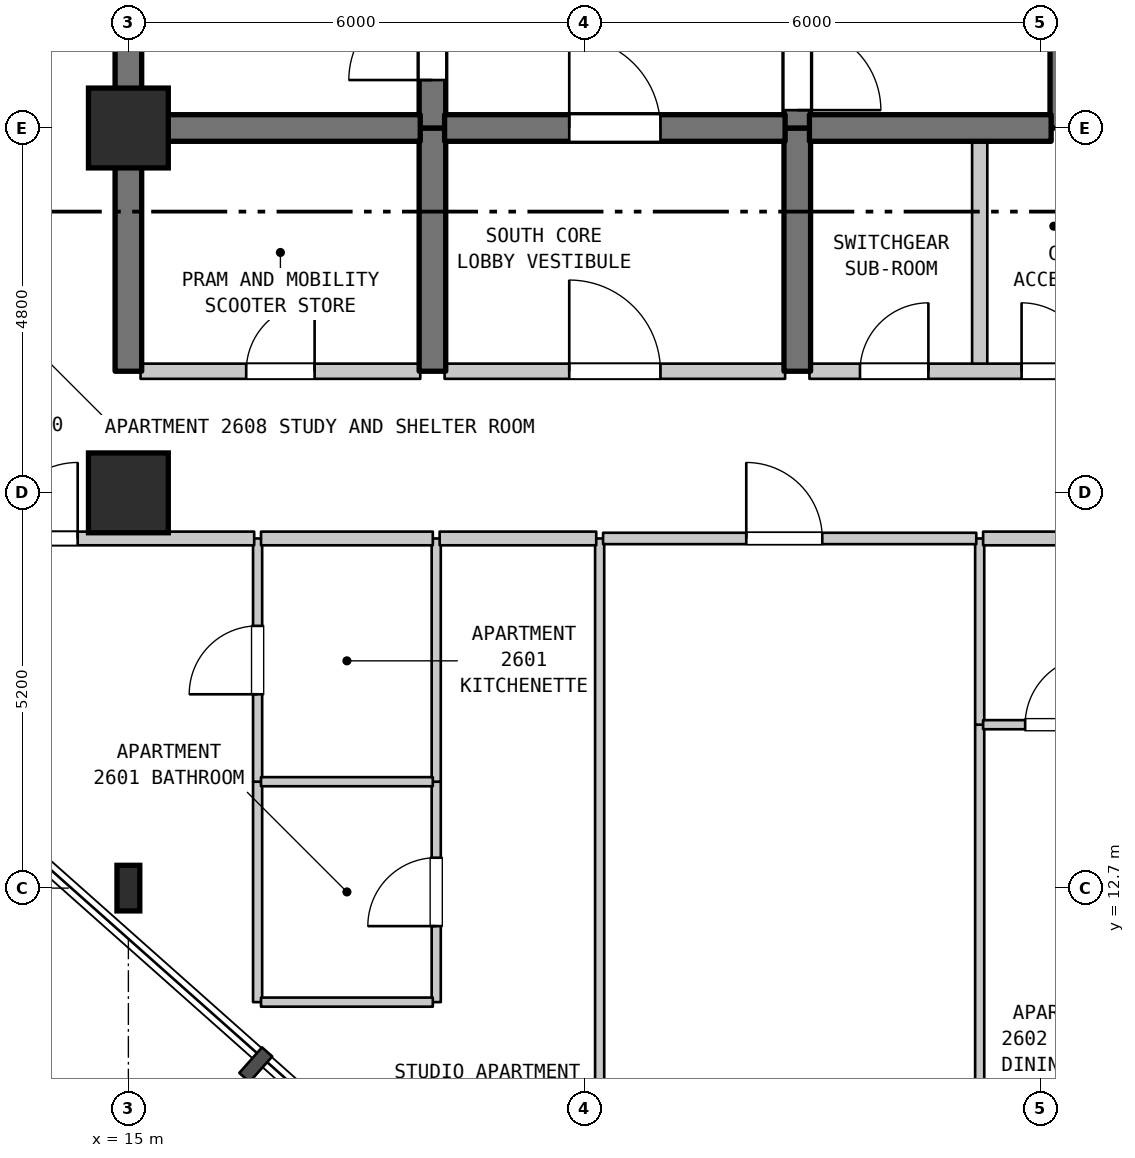
"""IFC4 building model, lengths in metres.
Left out: names, types, materials, properties, quantities, classifications, styles, units other than length and angle.
Written with IfcOpenShell. Run it as: python <this file> out.ifc"""

import sys

from ifc_helpers import new_model, si_unit, direction, frame, frame_2d, origin, origin_2d, place, context, subcontext, project, spatial, rectangle, i_section, extrude, element, fill, save


model = new_model("IFC4")
c1 = context("Model", 3, precision=1e-05, world=origin(), true_north=direction((0.0, 1.0)))
c2 = subcontext(c1, "Body", "Model", "MODEL_VIEW")
j1 = project(units=[si_unit("LENGTHUNIT", "METRE"), si_unit("PLANEANGLEUNIT", "RADIAN")], contexts=[c1])
p1 = place(None, origin())
s1 = spatial("IfcSite", under=j1, at=p1, CompositionType="ELEMENT")
p2 = place(p1, origin())
s2 = spatial("IfcBuilding", under=s1, at=p2, CompositionType="ELEMENT")
p3 = place(p2, frame((0.0, 0.0, 109.4)))
s3 = spatial("IfcBuildingStorey", under=s2, at=p3, CompositionType="ELEMENT", Elevation=109.4)
p4 = place(p3, frame((15.0, 12.7, 0.0), z_axis=(0.0, 0.0, 1.0), x_axis=(1.0, 0.0, 0.0)))
e1 = element("IfcColumn", 1, at=p4, inside=s3, PredefinedType="COLUMN", context=c2, shape_type="SweptSolid", body=[
    extrude(i_section(OverallWidth=0.3, OverallDepth=0.6, WebThickness=0.015, FlangeThickness=0.03, FilletRadius=0.027, at=origin_2d()), origin(), (0.0, 0.0, 1.0), 3.7),
])
for number, where, z_axis, x_axis in (
    (2, (15.0, 17.9, 0.0), (0.0, 0.0, 1.0), (1.0, 0.0, 0.0)),
    (3, (15.0, 22.7, 0.0), (0.0, 0.0, 1.0), (1.0, 0.0, 0.0)),
):
    element("IfcColumn", number, at=place(p3, frame(where, z_axis=z_axis, x_axis=x_axis)), inside=s3, PredefinedType="COLUMN", context=c2, shape_type="SweptSolid", body=[
        extrude(rectangle(XDim=1.05, YDim=1.05, at=origin_2d()), origin(), (0.0, 0.0, 1.0), 3.7),
    ])
p5 = place(p3, frame((15.0, 19.5, 0.0), z_axis=(0.0, 0.0, 1.0), x_axis=(0.0, 1.0, 0.0)))
e4 = element("IfcWall", 4, at=p5, inside=s3, PredefinedType="SHEAR", context=c2, shape_type="SweptSolid", body=[
    extrude(rectangle(XDim=3.2, YDim=0.35, at=frame_2d((1.6, 0.0))), origin(), (0.0, 0.0, 1.0), 3.385),
])
p6 = place(p3, frame((15.0, 22.7, 0.0), z_axis=(0.0, 0.0, 1.0), x_axis=(0.0, 1.0, 0.0)))
e5 = element("IfcWall", 5, at=p6, inside=s3, PredefinedType="SHEAR", context=c2, shape_type="SweptSolid", body=[
    extrude(rectangle(XDim=6.8, YDim=0.35, at=frame_2d((3.4, 0.0))), origin(), (0.0, 0.0, 1.0), 3.385),
])
p7 = place(p3, frame((16.7, 11.2, 0.0), z_axis=(0.0, 0.0, 1.0), x_axis=(0.0, 1.0, 0.0)))
e6 = element("IfcWall", 6, at=p7, inside=s3, PredefinedType="PARTITIONING", context=c2, shape_type="SweptSolid", body=[
    extrude(rectangle(XDim=2.9, YDim=0.12, at=frame_2d((1.45, 0.0))), origin(), (0.0, 0.0, 1.0), 3.385),
])
p8 = place(p3, frame((16.7, 14.1, 0.0), z_axis=(0.0, 0.0, 1.0), x_axis=(0.0, 1.0, 0.0)))
e7 = element("IfcWall", 7, at=p8, inside=s3, PredefinedType="PARTITIONING", context=c2, shape_type="SweptSolid", body=[
    extrude(rectangle(XDim=3.2, YDim=0.12, at=frame_2d((1.6, 0.0))), origin(), (0.0, 0.0, 1.0), 3.385),
])
p9 = place(p8, frame((1.15, 0.0, 0.0)))
e8 = element("IfcOpeningElement", 8, at=p9, cuts=e7, PredefinedType="OPENING", context=c2, shape_type="SweptSolid", body=[
    extrude(rectangle(XDim=0.9, YDim=2.15, at=frame_2d((0.45, 1.075))), frame((0.0, 0.07, 0.0), z_axis=(0.0, -1.0, 0.0), x_axis=(1.0, 0.0, 0.0)), (0.0, 0.0, 1.0), 0.14),
])
p10 = place(p3, frame((19.0, 19.5, 0.0), z_axis=(0.0, 0.0, 1.0), x_axis=(0.0, 1.0, 0.0)))
e9 = element("IfcWall", 9, at=p10, inside=s3, PredefinedType="SHEAR", context=c2, shape_type="SweptSolid", body=[
    extrude(rectangle(XDim=3.2, YDim=0.35, at=frame_2d((1.6, 0.0))), origin(), (0.0, 0.0, 1.0), 3.385),
])
p11 = place(p3, frame((19.0, 22.7, 0.0), z_axis=(0.0, 0.0, 1.0), x_axis=(0.0, 1.0, 0.0)))
e10 = element("IfcWall", 10, at=p11, inside=s3, PredefinedType="SHEAR", context=c2, shape_type="SweptSolid", body=[
    extrude(rectangle(XDim=5.5, YDim=0.35, at=frame_2d((2.75, 0.0))), origin(), (0.0, 0.0, 1.0), 3.385),
])
p12 = place(p11, frame((0.631, 0.0, 0.0)))
e11 = element("IfcOpeningElement", 11, at=p12, cuts=e10, PredefinedType="OPENING", context=c2, shape_type="SweptSolid", body=[
    extrude(rectangle(XDim=1.1, YDim=2.15, at=frame_2d((0.55, 1.075))), frame((0.0, 0.185, 0.0), z_axis=(0.0, -1.0, 0.0), x_axis=(1.0, 0.0, 0.0)), (0.0, 0.0, 1.0), 0.37),
])
p13 = place(p3, frame((19.05, 11.2, 0.0), z_axis=(0.0, 0.0, 1.0), x_axis=(0.0, 1.0, 0.0)))
e12 = element("IfcWall", 12, at=p13, inside=s3, PredefinedType="PARTITIONING", context=c2, shape_type="SweptSolid", body=[
    extrude(rectangle(XDim=2.9, YDim=0.12, at=frame_2d((1.45, 0.0))), origin(), (0.0, 0.0, 1.0), 3.385),
])
p14 = place(p13, frame((1.0, 0.0, 0.0)))
e13 = element("IfcOpeningElement", 13, at=p14, cuts=e12, PredefinedType="OPENING", context=c2, shape_type="SweptSolid", body=[
    extrude(rectangle(XDim=0.9, YDim=2.1, at=frame_2d((0.45, 1.05))), frame((0.0, 0.07, 0.0), z_axis=(0.0, -1.0, 0.0), x_axis=(1.0, 0.0, 0.0)), (0.0, 0.0, 1.0), 0.14),
])
p15 = place(p3, frame((19.05, 14.1, 0.0), z_axis=(0.0, 0.0, 1.0), x_axis=(0.0, 1.0, 0.0)))
e14 = element("IfcWall", 14, at=p15, inside=s3, PredefinedType="PARTITIONING", context=c2, shape_type="SweptSolid", body=[
    extrude(rectangle(XDim=3.2, YDim=0.12, at=frame_2d((1.6, 0.0))), origin(), (0.0, 0.0, 1.0), 3.385),
])
p16 = place(p3, frame((21.2, 2.227, 0.0), z_axis=(0.0, 0.0, 1.0), x_axis=(0.0, 1.0, 0.0)))
e15 = element("IfcWall", 15, at=p16, inside=s3, PredefinedType="PARTITIONING", context=c2, shape_type="SweptSolid", body=[
    extrude(rectangle(XDim=15.073, YDim=0.12, at=frame_2d((7.537, 0.0))), origin(), (0.0, 0.0, 1.0), 3.385),
])
p17 = place(p3, frame((23.8, 19.5, 0.0), z_axis=(0.0, 0.0, 1.0), x_axis=(0.0, 1.0, 0.0)))
e16 = element("IfcWall", 16, at=p17, inside=s3, PredefinedType="SHEAR", context=c2, shape_type="SweptSolid", body=[
    extrude(rectangle(XDim=3.2, YDim=0.35, at=frame_2d((1.6, 0.0))), origin(), (0.0, 0.0, 1.0), 3.385),
])
p18 = place(p3, frame((23.8, 22.7, 0.0), z_axis=(0.0, 0.0, 1.0), x_axis=(0.0, 1.0, 0.0)))
e17 = element("IfcWall", 17, at=p18, inside=s3, PredefinedType="SHEAR", context=c2, shape_type="SweptSolid", body=[
    extrude(rectangle(XDim=5.5, YDim=0.35, at=frame_2d((2.75, 0.0))), origin(), (0.0, 0.0, 1.0), 3.385),
])
p19 = place(p18, frame((0.235, 0.0, 0.0)))
e18 = element("IfcOpeningElement", 18, at=p19, cuts=e17, PredefinedType="OPENING", context=c2, shape_type="SweptSolid", body=[
    extrude(rectangle(XDim=1.1, YDim=2.15, at=frame_2d((0.55, 1.075))), frame((0.0, 0.185, 0.0), z_axis=(0.0, -1.0, 0.0), x_axis=(1.0, 0.0, 0.0)), (0.0, 0.0, 1.0), 0.37),
])
p20 = place(p3, frame((26.2, 0.71, 0.0), z_axis=(0.0, 0.0, 1.0), x_axis=(0.0, 1.0, 0.0)))
e19 = element("IfcWall", 19, at=p20, inside=s3, PredefinedType="PARTITIONING", context=c2, shape_type="SweptSolid", body=[
    extrude(rectangle(XDim=14.14, YDim=0.12, at=frame_2d((7.07, 0.0))), origin(), (0.0, 0.0, 1.0), 3.385),
])
p21 = place(p3, frame((26.2, 14.85, 0.0), z_axis=(0.0, 0.0, 1.0), x_axis=(0.0, 1.0, 0.0)))
e20 = element("IfcWall", 20, at=p21, inside=s3, PredefinedType="PARTITIONING", context=c2, shape_type="SweptSolid", body=[
    extrude(rectangle(XDim=2.45, YDim=0.12, at=frame_2d((1.225, 0.0))), origin(), (0.0, 0.0, 1.0), 3.385),
])
p22 = place(p3, frame((26.2, 19.5, 0.0), z_axis=(0.0, 0.0, 1.0), x_axis=(0.0, 1.0, 0.0)))
e21 = element("IfcWall", 21, at=p22, inside=s3, PredefinedType="STANDARD", context=c2, shape_type="SweptSolid", body=[
    extrude(rectangle(XDim=3.2, YDim=0.2, at=frame_2d((1.6, 0.0))), origin(), (0.0, 0.0, 1.0), 3.385),
])
p23 = place(p3, frame((27.3, 22.7, 0.0), z_axis=(0.0, 0.0, 1.0), x_axis=(0.0, 1.0, 0.0)))
e22 = element("IfcWall", 22, at=p23, inside=s3, PredefinedType="SHEAR", context=c2, shape_type="SweptSolid", body=[
    extrude(rectangle(XDim=2.9, YDim=0.35, at=frame_2d((1.45, 0.0))), origin(), (0.0, 0.0, 1.0), 3.385),
])
for number, where, z_axis, x_axis in (
    (23, (16.745, 11.2, 0.0), (0.0, 0.0, 1.0), (1.0, 0.0, 0.0)),
    (24, (16.745, 14.1, 0.0), (0.0, 0.0, 1.0), (1.0, 0.0, 0.0)),
):
    element("IfcWall", number, at=place(p3, frame(where, z_axis=z_axis, x_axis=x_axis)), inside=s3, PredefinedType="PARTITIONING", context=c2, shape_type="SweptSolid", body=[
        extrude(rectangle(XDim=2.26, YDim=0.12, at=frame_2d((1.13, 0.0))), origin(), (0.0, 0.0, 1.0), 3.385),
    ])
p24 = place(p3, frame((26.245, 14.85, 0.0), z_axis=(0.0, 0.0, 1.0), x_axis=(1.0, 0.0, 0.0)))
e25 = element("IfcWall", 25, at=p24, inside=s3, PredefinedType="PARTITIONING", context=c2, shape_type="SweptSolid", body=[
    extrude(rectangle(XDim=2.16, YDim=0.12, at=frame_2d((1.08, 0.0))), origin(), (0.0, 0.0, 1.0), 3.385),
])
p25 = place(p24, frame((0.553, 0.0, 0.0)))
e26 = element("IfcOpeningElement", 26, at=p25, cuts=e25, PredefinedType="OPENING", context=c2, shape_type="SweptSolid", body=[
    extrude(rectangle(XDim=0.9, YDim=2.15, at=frame_2d((0.45, 1.075))), frame((0.0, 0.07, 0.0), z_axis=(0.0, -1.0, 0.0), x_axis=(1.0, 0.0, 0.0)), (0.0, 0.0, 1.0), 0.14),
])
p26 = place(p3, frame((12.875, 17.3, 0.0), z_axis=(0.0, 0.0, 1.0), x_axis=(1.0, 0.0, 0.0)))
e27 = element("IfcWall", 27, at=p26, inside=s3, PredefinedType="STANDARD", context=c2, shape_type="SweptSolid", body=[
    extrude(rectangle(XDim=3.78, YDim=0.18, at=frame_2d((1.89, 0.0))), origin(), (0.0, 0.0, 1.0), 3.385),
])
p27 = place(p26, frame((0.458, 0.0, 0.0)))
e28 = element("IfcOpeningElement", 28, at=p27, cuts=e27, PredefinedType="OPENING", context=c2, shape_type="SweptSolid", body=[
    extrude(rectangle(XDim=1.0, YDim=2.15, at=frame_2d((0.5, 1.075))), frame((0.0, 0.1, 0.0), z_axis=(0.0, -1.0, 0.0), x_axis=(1.0, 0.0, 0.0)), (0.0, 0.0, 1.0), 0.2),
])
p28 = place(p3, frame((16.745, 17.3, 0.0), z_axis=(0.0, 0.0, 1.0), x_axis=(1.0, 0.0, 0.0)))
e29 = element("IfcWall", 29, at=p28, inside=s3, PredefinedType="STANDARD", context=c2, shape_type="SweptSolid", body=[
    extrude(rectangle(XDim=2.26, YDim=0.18, at=frame_2d((1.13, 0.0))), origin(), (0.0, 0.0, 1.0), 3.385),
])
p29 = place(p3, frame((19.095, 17.3, 0.0), z_axis=(0.0, 0.0, 1.0), x_axis=(1.0, 0.0, 0.0)))
e30 = element("IfcWall", 30, at=p29, inside=s3, PredefinedType="STANDARD", context=c2, shape_type="SweptSolid", body=[
    extrude(rectangle(XDim=2.06, YDim=0.18, at=frame_2d((1.03, 0.0))), origin(), (0.0, 0.0, 1.0), 3.385),
])
p30 = place(p3, frame((21.245, 17.3, 0.0), z_axis=(0.0, 0.0, 1.0), x_axis=(1.0, 0.0, 0.0)))
e31 = element("IfcWall", 31, at=p30, inside=s3, PredefinedType="STANDARD", context=c2, shape_type="SweptSolid", body=[
    extrude(rectangle(XDim=4.91, YDim=0.15, at=frame_2d((2.455, 0.0))), origin(), (0.0, 0.0, 1.0), 3.385),
])
p31 = place(p30, frame((1.884, 0.0, 0.0)))
e32 = element("IfcOpeningElement", 32, at=p31, cuts=e31, PredefinedType="OPENING", context=c2, shape_type="SweptSolid", body=[
    extrude(rectangle(XDim=1.0, YDim=2.15, at=frame_2d((0.5, 1.075))), frame((0.0, 0.085, 0.0), z_axis=(0.0, -1.0, 0.0), x_axis=(1.0, 0.0, 0.0)), (0.0, 0.0, 1.0), 0.17),
])
p32 = place(p3, frame((26.245, 17.3, 0.0), z_axis=(0.0, 0.0, 1.0), x_axis=(1.0, 0.0, 0.0)))
e33 = element("IfcWall", 33, at=p32, inside=s3, PredefinedType="STANDARD", context=c2, shape_type="SweptSolid", body=[
    extrude(rectangle(XDim=5.095, YDim=0.18, at=frame_2d((2.547, 0.0))), origin(), (0.0, 0.0, 1.0), 3.385),
])
p33 = place(p32, frame((2.08, 0.0, 0.0)))
e34 = element("IfcOpeningElement", 34, at=p33, cuts=e33, PredefinedType="OPENING", context=c2, shape_type="SweptSolid", body=[
    extrude(rectangle(XDim=1.0, YDim=2.15, at=frame_2d((0.5, 1.075))), frame((0.0, 0.1, 0.0), z_axis=(0.0, -1.0, 0.0), x_axis=(1.0, 0.0, 0.0)), (0.0, 0.0, 1.0), 0.2),
])
p34 = place(p3, frame((15.16, 19.5, 0.0), z_axis=(0.0, 0.0, 1.0), x_axis=(1.0, 0.0, 0.0)))
e35 = element("IfcWall", 35, at=p34, inside=s3, PredefinedType="STANDARD", context=c2, shape_type="SweptSolid", body=[
    extrude(rectangle(XDim=3.68, YDim=0.2, at=frame_2d((1.84, 0.0))), origin(), (0.0, 0.0, 1.0), 3.385),
])
p35 = place(p34, frame((1.39, 0.0, 0.0)))
e36 = element("IfcOpeningElement", 36, at=p35, cuts=e35, PredefinedType="OPENING", context=c2, shape_type="SweptSolid", body=[
    extrude(rectangle(XDim=0.9, YDim=2.15, at=frame_2d((0.45, 1.075))), frame((0.0, 0.11, 0.0), z_axis=(0.0, -1.0, 0.0), x_axis=(1.0, 0.0, 0.0)), (0.0, 0.0, 1.0), 0.22),
])
p36 = place(p3, frame((19.16, 19.5, 0.0), z_axis=(0.0, 0.0, 1.0), x_axis=(1.0, 0.0, 0.0)))
e37 = element("IfcWall", 37, at=p36, inside=s3, PredefinedType="STANDARD", context=c2, shape_type="SweptSolid", body=[
    extrude(rectangle(XDim=4.48, YDim=0.2, at=frame_2d((2.24, 0.0))), origin(), (0.0, 0.0, 1.0), 3.385),
])
p37 = place(p36, frame((1.64, 0.0, 0.0)))
e38 = element("IfcOpeningElement", 38, at=p37, cuts=e37, PredefinedType="OPENING", context=c2, shape_type="SweptSolid", body=[
    extrude(rectangle(XDim=1.2, YDim=2.2, at=frame_2d((0.6, 1.1))), frame((0.0, 0.11, 0.0), z_axis=(0.0, -1.0, 0.0), x_axis=(1.0, 0.0, 0.0)), (0.0, 0.0, 1.0), 0.22),
])
p38 = place(p3, frame((23.96, 19.5, 0.0), z_axis=(0.0, 0.0, 1.0), x_axis=(1.0, 0.0, 0.0)))
e39 = element("IfcWall", 39, at=p38, inside=s3, PredefinedType="STANDARD", context=c2, shape_type="SweptSolid", body=[
    extrude(rectangle(XDim=4.455, YDim=0.2, at=frame_2d((2.228, 0.0))), origin(), (0.0, 0.0, 1.0), 3.385),
])
p39 = place(p38, frame((0.665, 0.0, 0.0)))
e40 = element("IfcOpeningElement", 40, at=p39, cuts=e39, PredefinedType="OPENING", context=c2, shape_type="SweptSolid", body=[
    extrude(rectangle(XDim=0.9, YDim=2.15, at=frame_2d((0.45, 1.075))), frame((0.0, 0.11, 0.0), z_axis=(0.0, -1.0, 0.0), x_axis=(1.0, 0.0, 0.0)), (0.0, 0.0, 1.0), 0.22),
])
p40 = place(p38, frame((2.791, 0.0, 0.0)))
e41 = element("IfcOpeningElement", 41, at=p40, cuts=e39, PredefinedType="OPENING", context=c2, shape_type="SweptSolid", body=[
    extrude(rectangle(XDim=0.9, YDim=2.15, at=frame_2d((0.45, 1.075))), frame((0.0, 0.11, 0.0), z_axis=(0.0, -1.0, 0.0), x_axis=(1.0, 0.0, 0.0)), (0.0, 0.0, 1.0), 0.22),
])
p41 = place(p3, frame((15.16, 22.7, 0.0), z_axis=(0.0, 0.0, 1.0), x_axis=(1.0, 0.0, 0.0)))
e42 = element("IfcWall", 42, at=p41, inside=s3, PredefinedType="SHEAR", context=c2, shape_type="SweptSolid", body=[
    extrude(rectangle(XDim=3.68, YDim=0.35, at=frame_2d((1.84, 0.0))), origin(), (0.0, 0.0, 1.0), 3.385),
])
p42 = place(p3, frame((19.16, 22.7, 0.0), z_axis=(0.0, 0.0, 1.0), x_axis=(1.0, 0.0, 0.0)))
e43 = element("IfcWall", 43, at=p42, inside=s3, PredefinedType="SHEAR", context=c2, shape_type="SweptSolid", body=[
    extrude(rectangle(XDim=4.48, YDim=0.35, at=frame_2d((2.24, 0.0))), origin(), (0.0, 0.0, 1.0), 3.385),
])
p43 = place(p42, frame((1.64, 0.0, 0.0)))
e44 = element("IfcOpeningElement", 44, at=p43, cuts=e43, PredefinedType="OPENING", context=c2, shape_type="SweptSolid", body=[
    extrude(rectangle(XDim=1.2, YDim=2.2, at=frame_2d((0.6, 1.1))), frame((0.0, 0.185, 0.0), z_axis=(0.0, -1.0, 0.0), x_axis=(1.0, 0.0, 0.0)), (0.0, 0.0, 1.0), 0.37),
])
p44 = place(p3, frame((23.96, 22.7, 0.0), z_axis=(0.0, 0.0, 1.0), x_axis=(1.0, 0.0, 0.0)))
e45 = element("IfcWall", 45, at=p44, inside=s3, PredefinedType="SHEAR", context=c2, shape_type="SweptSolid", body=[
    extrude(rectangle(XDim=3.18, YDim=0.35, at=frame_2d((1.59, 0.0))), origin(), (0.0, 0.0, 1.0), 3.385),
])
p45 = place(p9, origin())
e46 = element("IfcDoor", 46, at=p45, inside=s3, OperationType="SINGLE_SWING_LEFT", PredefinedType="DOOR", context=c2, shape_type="SweptSolid", body=[
    extrude(rectangle(XDim=0.9, YDim=2.15, at=frame_2d((0.45, 1.075))), frame((0.0, 0.025, 0.0), z_axis=(0.0, -1.0, 0.0), x_axis=(1.0, 0.0, 0.0)), (0.0, 0.0, 1.0), 0.05),
])
fill(e8, e46)
p46 = place(p12, origin())
e47 = element("IfcDoor", 47, at=p46, inside=s3, OperationType="SINGLE_SWING_LEFT", PredefinedType="DOOR", context=c2, shape_type="SweptSolid", body=[
    extrude(rectangle(XDim=1.1, YDim=2.15, at=frame_2d((0.55, 1.075))), frame((0.0, 0.025, 0.0), z_axis=(0.0, -1.0, 0.0), x_axis=(1.0, 0.0, 0.0)), (0.0, 0.0, 1.0), 0.05),
])
fill(e11, e47)
p47 = place(p14, origin())
e48 = element("IfcDoor", 48, at=p47, inside=s3, OperationType="SINGLE_SWING_LEFT", PredefinedType="DOOR", context=c2, shape_type="SweptSolid", body=[
    extrude(rectangle(XDim=0.9, YDim=2.1, at=frame_2d((0.45, 1.05))), frame((0.0, 0.025, 0.0), z_axis=(0.0, -1.0, 0.0), x_axis=(1.0, 0.0, 0.0)), (0.0, 0.0, 1.0), 0.05),
])
fill(e13, e48)
p48 = place(p19, frame((1.1, 0.0, 0.0), z_axis=(0.0, 0.0, 1.0), x_axis=(-1.0, 0.0, 0.0)))
e49 = element("IfcDoor", 49, at=p48, inside=s3, OperationType="SINGLE_SWING_LEFT", PredefinedType="DOOR", context=c2, shape_type="SweptSolid", body=[
    extrude(rectangle(XDim=1.1, YDim=2.15, at=frame_2d((0.55, 1.075))), frame((0.0, 0.025, 0.0), z_axis=(0.0, -1.0, 0.0), x_axis=(1.0, 0.0, 0.0)), (0.0, 0.0, 1.0), 0.05),
])
fill(e18, e49)
p49 = place(p25, origin())
e50 = element("IfcDoor", 50, at=p49, inside=s3, OperationType="SINGLE_SWING_RIGHT", PredefinedType="DOOR", context=c2, shape_type="SweptSolid", body=[
    extrude(rectangle(XDim=0.9, YDim=2.15, at=frame_2d((0.45, 1.075))), frame((0.0, 0.025, 0.0), z_axis=(0.0, -1.0, 0.0), x_axis=(1.0, 0.0, 0.0)), (0.0, 0.0, 1.0), 0.05),
])
fill(e26, e50)
p50 = place(p27, origin())
e51 = element("IfcDoor", 51, at=p50, inside=s3, OperationType="SINGLE_SWING_RIGHT", PredefinedType="DOOR", context=c2, shape_type="SweptSolid", body=[
    extrude(rectangle(XDim=1.0, YDim=2.15, at=frame_2d((0.5, 1.075))), frame((0.0, 0.025, 0.0), z_axis=(0.0, -1.0, 0.0), x_axis=(1.0, 0.0, 0.0)), (0.0, 0.0, 1.0), 0.05),
])
fill(e28, e51)
p51 = place(p31, origin())
e52 = element("IfcDoor", 52, at=p51, inside=s3, OperationType="SINGLE_SWING_LEFT", PredefinedType="DOOR", context=c2, shape_type="SweptSolid", body=[
    extrude(rectangle(XDim=1.0, YDim=2.15, at=frame_2d((0.5, 1.075))), frame((0.0, 0.025, 0.0), z_axis=(0.0, -1.0, 0.0), x_axis=(1.0, 0.0, 0.0)), (0.0, 0.0, 1.0), 0.05),
])
fill(e32, e52)
p52 = place(p35, origin())
e53 = element("IfcDoor", 53, at=p52, inside=s3, OperationType="SINGLE_SWING_RIGHT", PredefinedType="DOOR", context=c2, shape_type="SweptSolid", body=[
    extrude(rectangle(XDim=0.9, YDim=2.15, at=frame_2d((0.45, 1.075))), frame((0.0, 0.025, 0.0), z_axis=(0.0, -1.0, 0.0), x_axis=(1.0, 0.0, 0.0)), (0.0, 0.0, 1.0), 0.05),
])
fill(e36, e53)
p53 = place(p37, origin())
e54 = element("IfcDoor", 54, at=p53, inside=s3, OperationType="SINGLE_SWING_LEFT", PredefinedType="DOOR", context=c2, shape_type="SweptSolid", body=[
    extrude(rectangle(XDim=1.2, YDim=2.2, at=frame_2d((0.6, 1.1))), frame((0.0, 0.025, 0.0), z_axis=(0.0, -1.0, 0.0), x_axis=(1.0, 0.0, 0.0)), (0.0, 0.0, 1.0), 0.05),
])
fill(e38, e54)
p54 = place(p39, origin())
e55 = element("IfcDoor", 55, at=p54, inside=s3, OperationType="SINGLE_SWING_RIGHT", PredefinedType="DOOR", context=c2, shape_type="SweptSolid", body=[
    extrude(rectangle(XDim=0.9, YDim=2.15, at=frame_2d((0.45, 1.075))), frame((0.0, 0.025, 0.0), z_axis=(0.0, -1.0, 0.0), x_axis=(1.0, 0.0, 0.0)), (0.0, 0.0, 1.0), 0.05),
])
fill(e40, e55)
p55 = place(p40, origin())
e56 = element("IfcDoor", 56, at=p55, inside=s3, OperationType="SINGLE_SWING_LEFT", PredefinedType="DOOR", context=c2, shape_type="SweptSolid", body=[
    extrude(rectangle(XDim=0.9, YDim=2.15, at=frame_2d((0.45, 1.075))), frame((0.0, 0.025, 0.0), z_axis=(0.0, -1.0, 0.0), x_axis=(1.0, 0.0, 0.0)), (0.0, 0.0, 1.0), 0.05),
])
fill(e41, e56)
p56 = place(p43, origin())
e57 = element("IfcDoor", 57, at=p56, inside=s3, OperationType="SINGLE_SWING_LEFT", PredefinedType="DOOR", context=c2, shape_type="SweptSolid", body=[
    extrude(rectangle(XDim=1.2, YDim=2.2, at=frame_2d((0.6, 1.1))), frame((0.0, 0.025, 0.0), z_axis=(0.0, -1.0, 0.0), x_axis=(1.0, 0.0, 0.0)), (0.0, 0.0, 1.0), 0.05),
])
fill(e44, e57)
save(model, sys.argv[1])
